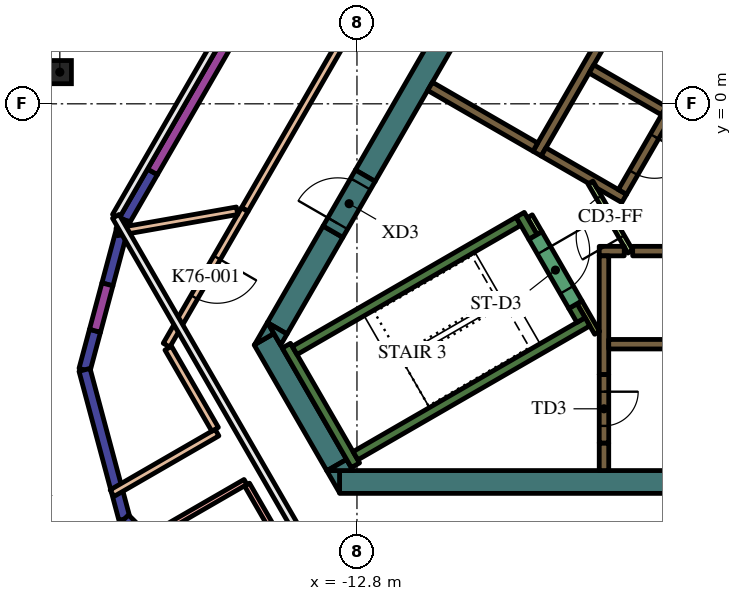
"""IFC4 building model, lengths in metres.
Left out: names, types, materials, properties, quantities, classifications, styles, units other than length and angle.
Written with IfcOpenShell. Run it as: python <this file> out.ifc"""

import sys

from ifc_helpers import new_model, si_unit, direction, frame, frame_2d, origin, origin_2d, place, context, subcontext, project, spatial, polyline, rectangle, hollow_circle, outline, extrude, element, fill, save


model = new_model("IFC4")
c1 = context("Model", 3, precision=1e-05, world=origin(), true_north=direction((0.0, 1.0)))
c2 = subcontext(c1, "Body", "Model", "MODEL_VIEW")
j1 = project(units=[si_unit("LENGTHUNIT", "METRE"), si_unit("PLANEANGLEUNIT", "RADIAN")], contexts=[c1])
p1 = place(None, origin())
s1 = spatial("IfcSite", under=j1, at=p1, CompositionType="ELEMENT")
p2 = place(p1, origin())
s2 = spatial("IfcBuilding", under=s1, at=p2, CompositionType="ELEMENT")
p3 = place(p2, frame((0.0, 0.0, 327.6)))
s3 = spatial("IfcBuildingStorey", under=s2, at=p3, CompositionType="ELEMENT", Elevation=327.6)
p4 = place(p3, frame((-20.619, 0.834, 0.0), z_axis=(0.0, 0.0, 1.0), x_axis=(1.0, 0.0, 0.0)))
e1 = element("IfcColumn", 1, at=p4, inside=s3, PredefinedType="COLUMN", context=c2, shape_type="SweptSolid", body=[
    extrude(hollow_circle(Radius=0.305, WallThickness=0.025, at=origin_2d()), origin(), (0.0, 0.0, 1.0), 4.2),
])
p5 = place(p3, frame((8.904, -9.95, 0.0), z_axis=(0.0, 0.0, 1.0), x_axis=(-1.0, 0.0, 0.0)))
e2 = element("IfcWall", 2, at=p5, inside=s3, PredefinedType="SOLIDWALL", context=c2, shape_type="SweptSolid", body=[
    extrude(rectangle(XDim=22.161, YDim=0.6, at=frame_2d((11.081, 0.0))), origin(), (0.0, 0.0, 1.0), 4.2),
])
p6 = place(p3, origin())
e3 = element("IfcWall", 3, at=p6, inside=s3, PredefinedType="SOLIDWALL", context=c2, shape_type="SweptSolid", body=[
    extrude(outline(polyline([(-13.597, -9.65), (-13.259, -9.65), (-13.259, -10.236), (-13.597, -9.65)])), origin(), (0.0, 0.0, 1.0), 4.2),
])
p7 = place(p3, frame((-13.333, -9.506, 0.0), z_axis=(0.0, 0.0, 1.0), x_axis=(-0.500019073792, 0.866014391245, 0.0)))
e4 = element("IfcWall", 4, at=p7, inside=s3, PredefinedType="SOLIDWALL", context=c2, shape_type="SweptSolid", body=[
    extrude(rectangle(XDim=3.823, YDim=0.6, at=frame_2d((1.912, 0.0))), origin(), (0.0, 0.0, 1.0), 4.2),
])
e5 = element("IfcWall", 5, at=p6, inside=s3, PredefinedType="SOLIDWALL", context=c2, shape_type="SweptSolid", body=[
    extrude(outline(polyline([(-14.987, -6.043), (-15.493, -6.335), (-15.156, -5.75), (-14.987, -6.043)])), origin(), (0.0, 0.0, 1.0), 4.2),
])
e6 = element("IfcWall", 6, at=p6, inside=s3, PredefinedType="SOLIDWALL", context=c2, shape_type="SweptSolid", body=[
    extrude(outline(polyline([(-12.904, -9.65), (-13.58, -9.65), (-13.073, -9.357), (-12.904, -9.65)])), origin(), (0.0, 0.0, 1.0), 4.2),
])
p8 = place(p3, frame((-13.432, -3.364, 0.0), z_axis=(0.0, 0.0, 1.0), x_axis=(-0.499960127962, -0.866048422692, 0.0)))
e7 = element("IfcWall", 7, at=p8, inside=s3, PredefinedType="SOLIDWALL", context=c2, shape_type="SweptSolid", body=[
    extrude(rectangle(XDim=2.934, YDim=0.6, at=frame_2d((1.467, 0.0))), origin(), (0.0, 0.0, 1.0), 4.2),
])
e8 = element("IfcWall", 8, at=p6, inside=s3, PredefinedType="SOLIDWALL", context=c2, shape_type="SweptSolid", body=[
    extrude(outline(polyline([(-14.809, -6.35), (-15.147, -5.764), (-14.64, -6.057), (-14.809, -6.35)])), origin(), (0.0, 0.0, 1.0), 4.2),
])
p9 = place(p3, frame((-4.652, 11.842, 0.0), z_axis=(0.0, 0.0, 1.0), x_axis=(-0.500003640647, -0.866023301845, 0.0)))
e9 = element("IfcWall", 9, at=p9, inside=s3, PredefinedType="SOLIDWALL", context=c2, shape_type="SweptSolid", body=[
    extrude(rectangle(XDim=15.858, YDim=0.6, at=frame_2d((7.929, 0.0))), origin(), (0.0, 0.0, 1.0), 4.2),
])
p10 = place(p3, frame((-12.84, -9.511, 0.0), z_axis=(0.0, 0.0, 1.0), x_axis=(-0.499997733992, 0.866026712061, 0.0)))
e10 = element("IfcWall", 10, at=p10, inside=s3, PredefinedType="SOLIDWALL", context=c2, shape_type="SweptSolid", body=[
    extrude(rectangle(XDim=3.634, YDim=0.25, at=frame_2d((1.817, 0.0))), origin(), (0.0, 0.0, 1.0), 4.2),
])
p11 = place(p3, frame((-14.44, -6.49, 0.0), z_axis=(0.0, 0.0, 1.0), x_axis=(0.866022966069, 0.500004222222, 0.0)))
e11 = element("IfcWall", 11, at=p11, inside=s3, PredefinedType="SOLIDWALL", context=c2, shape_type="SweptSolid", body=[
    extrude(rectangle(XDim=6.8, YDim=0.25, at=frame_2d((3.4, 0.0))), origin(), (0.0, 0.0, 1.0), 4.2),
])
p12 = place(p3, frame((-8.168, -3.503, 0.0), z_axis=(0.0, 0.0, 1.0), x_axis=(-0.499952099219, 0.866053057547, 0.0)))
e12 = element("IfcWall", 12, at=p12, inside=s3, PredefinedType="SOLIDWALL", context=c2, shape_type="SweptSolid", body=[
    extrude(rectangle(XDim=0.675, YDim=0.25, at=frame_2d((0.337, 0.0))), origin(), (0.0, 0.0, 1.0), 4.2),
])
p13 = place(p3, frame((-12.84, -9.261, 0.0), z_axis=(0.0, 0.0, 1.0), x_axis=(0.866016039709, 0.500016218704, 0.0)))
e13 = element("IfcWall", 13, at=p13, inside=s3, PredefinedType="SOLIDWALL", context=c2, shape_type="SweptSolid", body=[
    extrude(rectangle(XDim=7.05, YDim=0.25, at=frame_2d((3.525, 0.0))), origin(), (0.0, 0.0, 1.0), 4.2),
])
p14 = place(p3, frame((-6.905, -5.69, 0.0), z_axis=(0.0, 0.0, 1.0), x_axis=(-0.500402024738, 0.865793170242, 0.0)))
e14 = element("IfcWall", 14, at=p14, inside=s3, PredefinedType="SOLIDWALL", context=c2, shape_type="SweptSolid", body=[
    extrude(rectangle(XDim=0.425, YDim=0.25, at=frame_2d((0.212, 0.0))), origin(), (0.0, 0.0, 1.0), 4.2),
])
p15 = place(p3, frame((-5.545, -3.875, 0.0), z_axis=(0.0, 0.0, 1.0), x_axis=(1.0, 0.0, 0.0)))
e15 = element("IfcWall", 15, at=p15, inside=s3, PredefinedType="SOLIDWALL", context=c2, shape_type="SweptSolid", body=[
    extrude(rectangle(XDim=11.97, YDim=0.25, at=frame_2d((5.985, 0.0))), origin(), (0.0, 0.0, 1.0), 4.2),
])
p16 = place(p3, frame((-6.425, -3.875, 0.0), z_axis=(0.0, 0.0, 1.0), x_axis=(1.0, 0.0, 0.0)))
e16 = element("IfcWall", 16, at=p16, inside=s3, PredefinedType="SOLIDWALL", context=c2, shape_type="SweptSolid", body=[
    extrude(rectangle(XDim=0.658, YDim=0.25, at=frame_2d((0.329, 0.0))), origin(), (0.0, 0.0, 1.0), 4.2),
])
p17 = place(p3, frame((-6.3, -7.125, 0.0), z_axis=(0.0, 0.0, 1.0), x_axis=(0.0, 1.0, 0.0)))
e17 = element("IfcWall", 17, at=p17, inside=s3, PredefinedType="SOLIDWALL", context=c2, shape_type="SweptSolid", body=[
    extrude(rectangle(XDim=3.125, YDim=0.25, at=frame_2d((1.562, 0.0))), origin(), (0.0, 0.0, 1.0), 4.2),
])
p18 = place(p3, frame((-6.3, -8.925, 0.0), z_axis=(0.0, 0.0, 1.0), x_axis=(0.0, -1.0, 0.0)))
e18 = element("IfcWall", 18, at=p18, inside=s3, PredefinedType="SOLIDWALL", context=c2, shape_type="SweptSolid", body=[
    extrude(rectangle(XDim=0.725, YDim=0.25, at=frame_2d((0.363, 0.0))), origin(), (0.0, 0.0, 1.0), 4.2),
])
p19 = place(p3, frame((-8.06, -1.311, 0.0), z_axis=(0.0, 0.0, 1.0), x_axis=(0.50000273126, 0.866023826885, 0.0)))
e19 = element("IfcWall", 19, at=p19, inside=s3, PredefinedType="SOLIDWALL", context=c2, shape_type="SweptSolid", body=[
    extrude(rectangle(XDim=10.33, YDim=0.25, at=frame_2d((5.165, 0.0))), origin(), (0.0, 0.0, 1.0), 4.2),
])
p20 = place(p3, frame((-4.724, -0.182, 0.0), z_axis=(0.0, 0.0, 1.0), x_axis=(-0.866008176907, 0.50002983664, 0.0)))
e20 = element("IfcWall", 20, at=p20, inside=s3, PredefinedType="SOLIDWALL", context=c2, shape_type="SweptSolid", body=[
    extrude(rectangle(XDim=2.2, YDim=0.25, at=frame_2d((1.1, 0.0))), origin(), (0.0, 0.0, 1.0), 4.2),
])
e21 = element("IfcWall", 21, at=p6, inside=s3, PredefinedType="SOLIDWALL", context=c2, shape_type="SweptSolid", body=[
    extrude(outline(polyline([(-5.922, -2.257), (-5.922, -2.257), (-5.705, -2.382), (-5.83, -2.598), (-6.483, -2.221), (-6.591, -2.033), (-6.591, -2.033), (-6.7, -2.096), (-7.952, -1.373), (-7.827, -1.156), (-5.922, -2.257)])), origin(), (0.0, 0.0, 1.0), 4.2),
])
p21 = place(p3, frame((-8.106, -1.14, 0.0), z_axis=(0.0, 0.0, 1.0), x_axis=(-0.866008981251, 0.500028443584, 0.0)))
e22 = element("IfcWall", 22, at=p21, inside=s3, PredefinedType="SOLIDWALL", context=c2, shape_type="SweptSolid", body=[
    extrude(rectangle(XDim=3.2, YDim=0.25, at=frame_2d((1.6, 0.0))), origin(), (0.0, 0.0, 1.0), 4.2),
])
p22 = place(p3, frame((-8.252, -2.958, 0.0), z_axis=(0.0, 0.0, 1.0), x_axis=(0.500174715838, -0.865924508047, 0.0)))
e23 = element("IfcWall", 23, at=p22, inside=s3, PredefinedType="PARTITIONING", context=c2, shape_type="SweptSolid", body=[
    extrude(rectangle(XDim=0.514, YDim=0.15, at=frame_2d((0.257, 0.0))), origin(), (0.0, 0.0, 1.0), 3.45),
])
p23 = place(p3, frame((-6.48, -6.027, 0.0), z_axis=(0.0, 0.0, 1.0), x_axis=(-0.499927229454, 0.866067413802, 0.0)))
e24 = element("IfcWall", 24, at=p23, inside=s3, PredefinedType="PARTITIONING", context=c2, shape_type="SweptSolid", body=[
    extrude(rectangle(XDim=0.929, YDim=0.15, at=frame_2d((0.464, 0.0))), origin(), (0.0, 0.0, 1.0), 4.2),
])
p24 = place(p3, frame((-6.175, -6.325, 0.0), z_axis=(0.0, 0.0, 1.0), x_axis=(1.0, 0.0, 0.0)))
e25 = element("IfcWall", 25, at=p24, inside=s3, PredefinedType="SOLIDWALL", context=c2, shape_type="SweptSolid", body=[
    extrude(rectangle(XDim=12.35, YDim=0.25, at=frame_2d((6.175, 0.0))), origin(), (0.0, 0.0, 1.0), 4.2),
])
p25 = place(p24, frame((3.205, 0.0, 0.0)))
e26 = element("IfcOpeningElement", 26, at=p25, cuts=e25, PredefinedType="OPENING", context=c2, shape_type="SweptSolid", body=[
    extrude(rectangle(XDim=0.9, YDim=2.1, at=frame_2d((0.45, 1.05))), frame((0.0, 0.135, 0.0), z_axis=(0.0, -1.0, 0.0), x_axis=(1.0, 0.0, 0.0)), (0.0, 0.0, 1.0), 0.27),
])
p26 = place(p24, frame((8.145, 0.0, 0.0)))
e27 = element("IfcOpeningElement", 27, at=p26, cuts=e25, PredefinedType="OPENING", context=c2, shape_type="SweptSolid", body=[
    extrude(rectangle(XDim=1.1, YDim=2.1, at=frame_2d((0.55, 1.05))), frame((0.0, 0.135, 0.0), z_axis=(0.0, -1.0, 0.0), x_axis=(1.0, 0.0, 0.0)), (0.0, 0.0, 1.0), 0.27),
])
p27 = place(p24, frame((10.665, 0.0, 0.0)))
e28 = element("IfcOpeningElement", 28, at=p27, cuts=e25, PredefinedType="OPENING", context=c2, shape_type="SweptSolid", body=[
    extrude(rectangle(XDim=1.1, YDim=2.1, at=frame_2d((0.55, 1.05))), frame((0.0, 0.135, 0.0), z_axis=(0.0, -1.0, 0.0), x_axis=(1.0, 0.0, 0.0)), (0.0, 0.0, 1.0), 0.27),
])
p28 = place(p3, frame((-0.898, 6.194, 0.0), z_axis=(0.0, 0.0, 1.0), x_axis=(-0.499996202215, -0.866027596426, 0.0)))
e29 = element("IfcWall", 29, at=p28, inside=s3, PredefinedType="SOLIDWALL", context=c2, shape_type="SweptSolid", body=[
    extrude(rectangle(XDim=9.83, YDim=0.25, at=frame_2d((4.915, 0.0))), origin(), (0.0, 0.0, 1.0), 4.2),
])
p29 = place(p28, frame((0.585, 0.0, 0.0)))
e30 = element("IfcOpeningElement", 30, at=p29, cuts=e29, PredefinedType="OPENING", context=c2, shape_type="SweptSolid", body=[
    extrude(rectangle(XDim=1.1, YDim=2.1, at=frame_2d((0.55, 1.05))), frame((0.0, 0.135, 0.0), z_axis=(0.0, -1.0, 0.0), x_axis=(1.0, 0.0, 0.0)), (0.0, 0.0, 1.0), 0.27),
])
p30 = place(p28, frame((3.105, 0.0, 0.0)))
e31 = element("IfcOpeningElement", 31, at=p30, cuts=e29, PredefinedType="OPENING", context=c2, shape_type="SweptSolid", body=[
    extrude(rectangle(XDim=1.1, YDim=2.1, at=frame_2d((0.55, 1.05))), frame((0.0, 0.135, 0.0), z_axis=(0.0, -1.0, 0.0), x_axis=(1.0, 0.0, 0.0)), (0.0, 0.0, 1.0), 0.27),
])
p31 = place(p28, frame((5.625, 0.0, 0.0)))
e32 = element("IfcOpeningElement", 32, at=p31, cuts=e29, PredefinedType="OPENING", context=c2, shape_type="SweptSolid", body=[
    extrude(rectangle(XDim=1.1, YDim=2.1, at=frame_2d((0.55, 1.05))), frame((0.0, 0.135, 0.0), z_axis=(0.0, -1.0, 0.0), x_axis=(1.0, 0.0, 0.0)), (0.0, 0.0, 1.0), 0.27),
])
p32 = place(p28, frame((8.145, 0.0, 0.0)))
e33 = element("IfcOpeningElement", 33, at=p32, cuts=e29, PredefinedType="OPENING", context=c2, shape_type="SweptSolid", body=[
    extrude(rectangle(XDim=1.1, YDim=2.1, at=frame_2d((0.55, 1.05))), frame((0.0, 0.135, 0.0), z_axis=(0.0, -1.0, 0.0), x_axis=(1.0, 0.0, 0.0)), (0.0, 0.0, 1.0), 0.27),
])
p33 = place(p3, frame((-8.103, -3.466, 0.0), z_axis=(0.0, 0.0, 1.0), x_axis=(0.500078061341, -0.865980330357, 0.0)))
e34 = element("IfcWall", 34, at=p33, inside=s3, PredefinedType="SOLIDWALL", context=c2, shape_type="SweptSolid", body=[
    extrude(rectangle(XDim=2.1, YDim=0.4, at=frame_2d((1.05, 0.0))), origin(), (0.0, 0.0, 1.0), 4.2),
])
p34 = place(p33, frame((0.45, 0.0, 0.0)))
e35 = element("IfcOpeningElement", 35, at=p34, cuts=e34, PredefinedType="OPENING", context=c2, shape_type="SweptSolid", body=[
    extrude(rectangle(XDim=1.2, YDim=2.1, at=frame_2d((0.6, 1.05))), frame((0.0, 0.21, 0.0), z_axis=(0.0, -1.0, 0.0), x_axis=(1.0, 0.0, 0.0)), (0.0, 0.0, 1.0), 0.42),
])
p35 = place(p3, frame((-6.3, -7.125, 0.0), z_axis=(0.0, 0.0, 1.0), x_axis=(0.0, -1.0, 0.0)))
e36 = element("IfcWall", 36, at=p35, inside=s3, PredefinedType="SOLIDWALL", context=c2, shape_type="SweptSolid", body=[
    extrude(rectangle(XDim=1.8, YDim=0.25, at=frame_2d((0.9, 0.0))), origin(), (0.0, 0.0, 1.0), 4.2),
])
p36 = place(p35, frame((0.45, 0.0, 0.0)))
e37 = element("IfcOpeningElement", 37, at=p36, cuts=e36, PredefinedType="OPENING", context=c2, shape_type="SweptSolid", body=[
    extrude(rectangle(XDim=0.9, YDim=2.1, at=frame_2d((0.45, 1.05))), frame((0.0, 0.135, 0.0), z_axis=(0.0, -1.0, 0.0), x_axis=(1.0, 0.0, 0.0)), (0.0, 0.0, 1.0), 0.27),
])
p37 = place(p3, frame((-5.606, -3.89, 0.0), z_axis=(0.0, 0.0, 1.0), x_axis=(-0.500027713859, 0.866009402589, 0.0)))
e38 = element("IfcWall", 38, at=p37, inside=s3, PredefinedType="PARTITIONING", context=c2, shape_type="SweptSolid", body=[
    extrude(rectangle(XDim=2.1, YDim=0.15, at=frame_2d((1.05, 0.0))), origin(), (0.0, 0.0, 1.0), 3.45),
])
p38 = place(p37, frame((0.45, 0.0, 0.0)))
e39 = element("IfcOpeningElement", 39, at=p38, cuts=e38, PredefinedType="OPENING", context=c2, shape_type="SweptSolid", body=[
    extrude(rectangle(XDim=1.2, YDim=2.1, at=frame_2d((0.6, 1.05))), frame((0.0, 0.085, 0.0), z_axis=(0.0, -1.0, 0.0), x_axis=(1.0, 0.0, 0.0)), (0.0, 0.0, 1.0), 0.17),
])
p39 = place(p3, frame((-13.432, -3.364, 0.0), z_axis=(0.0, 0.0, 1.0), x_axis=(0.500000056704, 0.866025371046, 0.0)))
e40 = element("IfcWall", 40, at=p39, inside=s3, PredefinedType="SOLIDWALL", context=c2, shape_type="SweptSolid", body=[
    extrude(rectangle(XDim=1.7, YDim=0.6, at=frame_2d((0.85, 0.0))), origin(), (0.0, 0.0, 1.0), 4.2),
])
p40 = place(p39, frame((0.25, 0.0, 0.0)))
e41 = element("IfcOpeningElement", 41, at=p40, cuts=e40, PredefinedType="OPENING", context=c2, shape_type="SweptSolid", body=[
    extrude(rectangle(XDim=1.2, YDim=2.1, at=frame_2d((0.6, 1.05))), frame((0.0, 0.31, 0.0), z_axis=(0.0, -1.0, 0.0), x_axis=(1.0, 0.0, 0.0)), (0.0, 0.0, 1.0), 0.62),
])
p41 = place(p3, frame((-9.529, 7.996, 0.0), z_axis=(0.0, 0.0, 1.0), x_axis=(-0.499982954681, -0.866035244681, 0.0)))
e42 = element("IfcWall", 42, at=p41, inside=s3, PredefinedType="PARTITIONING", context=c2, shape_type="SweptSolid", body=[
    extrude(rectangle(XDim=12.439, YDim=0.2, at=frame_2d((6.22, 0.0))), origin(), (0.0, 0.0, 1.0), 3.45),
])
p42 = place(p41, frame((5.62, 0.0, 0.0)))
e43 = element("IfcOpeningElement", 43, at=p42, cuts=e42, PredefinedType="OPENING", context=c2, shape_type="SweptSolid", body=[
    extrude(rectangle(XDim=1.2, YDim=2.1, at=frame_2d((0.6, 1.05))), frame((0.0, 0.11, 0.0), z_axis=(0.0, -1.0, 0.0), x_axis=(1.0, 0.0, 0.0)), (0.0, 0.0, 1.0), 0.22),
])
p43 = place(p3, frame((-15.753, -2.785, 0.0), z_axis=(0.0, 0.0, 1.0), x_axis=(-0.500004836318, -0.866022611517, 0.0)))
e44 = element("IfcWall", 44, at=p43, inside=s3, PredefinedType="PARTITIONING", context=c2, shape_type="SweptSolid", body=[
    extrude(rectangle(XDim=4.116, YDim=0.2, at=frame_2d((2.058, 0.0))), origin(), (0.0, 0.0, 1.0), 3.45),
])
p44 = place(p43, frame((1.458, 0.0, 0.0)))
e45 = element("IfcOpeningElement", 45, at=p44, cuts=e44, PredefinedType="OPENING", context=c2, shape_type="SweptSolid", body=[
    extrude(rectangle(XDim=1.2, YDim=2.1, at=frame_2d((0.6, 1.05))), frame((0.0, 0.11, 0.0), z_axis=(0.0, -1.0, 0.0), x_axis=(1.0, 0.0, 0.0)), (0.0, 0.0, 1.0), 0.22),
])
p45 = place(p3, frame((-19.123, -3.372, 0.0), z_axis=(0.0, 0.0, 1.0), x_axis=(0.984810286539, 0.173633808708, 0.0)))
e46 = element("IfcWall", 46, at=p45, inside=s3, PredefinedType="PARTITIONING", context=c2, shape_type="SweptSolid", body=[
    extrude(rectangle(XDim=3.217, YDim=0.2, at=frame_2d((1.608, 0.0))), origin(), (0.0, 0.0, 1.0), 3.45),
])
p46 = place(p3, frame((-19.244, -10.245, 0.0), z_axis=(0.0, 0.0, 1.0), x_axis=(0.866019818373, 0.500009674092, 0.0)))
e47 = element("IfcWall", 47, at=p46, inside=s3, PredefinedType="PARTITIONING", context=c2, shape_type="SweptSolid", body=[
    extrude(rectangle(XDim=3.188, YDim=0.2, at=frame_2d((1.594, 0.0))), origin(), (0.0, 0.0, 1.0), 3.45),
])
p47 = place(p3, frame((-15.733, -9.949, 0.0), z_axis=(0.0, 0.0, 1.0), x_axis=(-0.866019818373, -0.500009674092, 0.0)))
e48 = element("IfcWall", 48, at=p47, inside=s3, PredefinedType="PARTITIONING", context=c2, shape_type="SweptSolid", body=[
    extrude(rectangle(XDim=3.188, YDim=0.15, at=frame_2d((1.594, 0.0))), origin(), (0.0, 0.0, 1.0), 3.45),
])
p48 = place(p3, frame((-16.533, -8.564, 0.0), z_axis=(0.0, 0.0, 1.0), x_axis=(-0.49998236749, 0.86603558368, 0.0)))
e49 = element("IfcWall", 49, at=p48, inside=s3, PredefinedType="PARTITIONING", context=c2, shape_type="SweptSolid", body=[
    extrude(rectangle(XDim=2.466, YDim=0.2, at=frame_2d((1.233, 0.0))), origin(), (0.0, 0.0, 1.0), 3.45),
])
p49 = place(p3, frame((-14.44, -12.189, 0.0), z_axis=(0.0, 0.0, 1.0), x_axis=(-0.499983837127, 0.866034735222, 0.0)))
e50 = element("IfcWall", 50, at=p49, inside=s3, PredefinedType="PARTITIONING", context=c2, shape_type="SweptSolid", body=[
    extrude(rectangle(XDim=2.506, YDim=0.15, at=frame_2d((1.253, 0.0))), origin(), (0.0, 0.0, 1.0), 3.45),
])
p50 = place(p3, frame((-7.54, 16.64, 0.0), z_axis=(0.0, 0.0, 1.0), x_axis=(-0.500002158106, -0.866024157798, 0.0)))
e51 = element("IfcWall", 51, at=p50, inside=s3, PredefinedType="SOLIDWALL", context=c2, shape_type="SweptSolid", body=[
    extrude(rectangle(XDim=21.282, YDim=0.3, at=frame_2d((10.641, 0.0))), origin(), (0.0, 0.0, 1.0), 3.45),
])
p51 = place(p3, frame((-18.181, -1.79, 0.0), z_axis=(0.0, 0.0, 1.0), x_axis=(-0.500049712553, -0.865996700326, 0.0)))
e52 = element("IfcWall", 52, at=p51, inside=s3, PredefinedType="SOLIDWALL", context=c2, shape_type="SweptSolid", body=[
    extrude(rectangle(XDim=1.464, YDim=0.3, at=frame_2d((0.732, 0.0))), origin(), (0.0, 0.0, 1.0), 3.95),
])
p52 = place(p3, frame((-18.913, -3.058, 0.0), z_axis=(0.0, 0.0, 1.0), x_axis=(-0.258824282894, -0.965924422812, 0.0)))
e53 = element("IfcWall", 53, at=p52, inside=s3, PredefinedType="SOLIDWALL", context=c2, shape_type="SweptSolid", body=[
    extrude(rectangle(XDim=1.753, YDim=0.3, at=frame_2d((0.876, 0.0))), origin(), (0.0, 0.0, 1.0), 3.95),
])
p53 = place(p3, frame((-19.366, -4.751, 0.0), z_axis=(0.0, 0.0, 1.0), x_axis=(-0.258816538161, -0.965926498018, 0.0)))
e54 = element("IfcWall", 54, at=p53, inside=s3, PredefinedType="SOLIDWALL", context=c2, shape_type="SweptSolid", body=[
    extrude(rectangle(XDim=1.264, YDim=0.3, at=frame_2d((0.632, 0.0))), origin(), (0.0, 0.0, 1.0), 3.45),
])
p54 = place(p3, frame((-19.694, -5.972, 0.0), z_axis=(0.0, 0.0, 1.0), x_axis=(-0.258690231517, -0.96596033258, 0.0)))
e55 = element("IfcWall", 55, at=p54, inside=s3, PredefinedType="SOLIDWALL", context=c2, shape_type="SweptSolid", body=[
    extrude(rectangle(XDim=1.064, YDim=0.3, at=frame_2d((0.532, 0.0))), origin(), (0.0, 0.0, 1.0), 3.95),
])
for number, where, z_axis, x_axis in (
    (56, (-19.969, -7.0, 0.0), (0.0, 0.0, 1.0), (0.259, -0.966, 0.0)),
    (57, (-18.918, -10.922, 0.0), (0.0, 0.0, 1.0), (0.707, -0.707, 0.0)),
):
    element("IfcWall", number, at=place(p3, frame(where, z_axis=z_axis, x_axis=x_axis)), inside=s3, PredefinedType="SOLIDWALL", context=c2, shape_type="SweptSolid", body=[
        extrude(rectangle(XDim=4.061, YDim=0.3, at=frame_2d((2.03, 0.0))), origin(), (0.0, 0.0, 1.0), 3.95),
    ])
p55 = place(p32, origin())
e58 = element("IfcDoor", 58, at=p55, inside=s3, OperationType="DOUBLE_DOOR_SLIDING", PredefinedType="DOOR", context=c2, shape_type="SweptSolid", body=[
    extrude(rectangle(XDim=1.1, YDim=2.1, at=frame_2d((0.55, 1.05))), frame((0.0, 0.025, 0.0), z_axis=(0.0, -1.0, 0.0), x_axis=(1.0, 0.0, 0.0)), (0.0, 0.0, 1.0), 0.05),
])
fill(e33, e58)
p56 = place(p34, origin())
e59 = element("IfcDoor", 59, at=p56, inside=s3, OperationType="SINGLE_SWING_LEFT", PredefinedType="DOOR", context=c2, shape_type="SweptSolid", body=[
    extrude(rectangle(XDim=1.2, YDim=2.1, at=frame_2d((0.6, 1.05))), frame((0.0, 0.025, 0.0), z_axis=(0.0, -1.0, 0.0), x_axis=(1.0, 0.0, 0.0)), (0.0, 0.0, 1.0), 0.05),
])
fill(e35, e59)
p57 = place(p36, origin())
e60 = element("IfcDoor", 60, at=p57, inside=s3, OperationType="SINGLE_SWING_LEFT", PredefinedType="DOOR", context=c2, shape_type="SweptSolid", body=[
    extrude(rectangle(XDim=0.9, YDim=2.1, at=frame_2d((0.45, 1.05))), frame((0.0, 0.025, 0.0), z_axis=(0.0, -1.0, 0.0), x_axis=(1.0, 0.0, 0.0)), (0.0, 0.0, 1.0), 0.05),
])
fill(e37, e60)
p58 = place(p38, origin())
e61 = element("IfcDoor", 61, at=p58, inside=s3, OperationType="SINGLE_SWING_LEFT", PredefinedType="DOOR", context=c2, shape_type="SweptSolid", body=[
    extrude(rectangle(XDim=1.2, YDim=2.1, at=frame_2d((0.6, 1.05))), frame((0.0, 0.025, 0.0), z_axis=(0.0, -1.0, 0.0), x_axis=(1.0, 0.0, 0.0)), (0.0, 0.0, 1.0), 0.05),
])
fill(e39, e61)
p59 = place(p40, origin())
e62 = element("IfcDoor", 62, at=p59, inside=s3, OperationType="SINGLE_SWING_LEFT", PredefinedType="DOOR", context=c2, shape_type="SweptSolid", body=[
    extrude(rectangle(XDim=1.2, YDim=2.1, at=frame_2d((0.6, 1.05))), frame((0.0, 0.025, 0.0), z_axis=(0.0, -1.0, 0.0), x_axis=(1.0, 0.0, 0.0)), (0.0, 0.0, 1.0), 0.05),
])
fill(e41, e62)
p60 = place(p44, origin())
e63 = element("IfcDoor", 63, at=p60, inside=s3, OperationType="SINGLE_SWING_LEFT", PredefinedType="DOOR", context=c2, shape_type="SweptSolid", body=[
    extrude(rectangle(XDim=1.2, YDim=2.1, at=frame_2d((0.6, 1.05))), frame((0.0, 0.025, 0.0), z_axis=(0.0, -1.0, 0.0), x_axis=(1.0, 0.0, 0.0)), (0.0, 0.0, 1.0), 0.05),
])
fill(e45, e63)
save(model, sys.argv[1])
